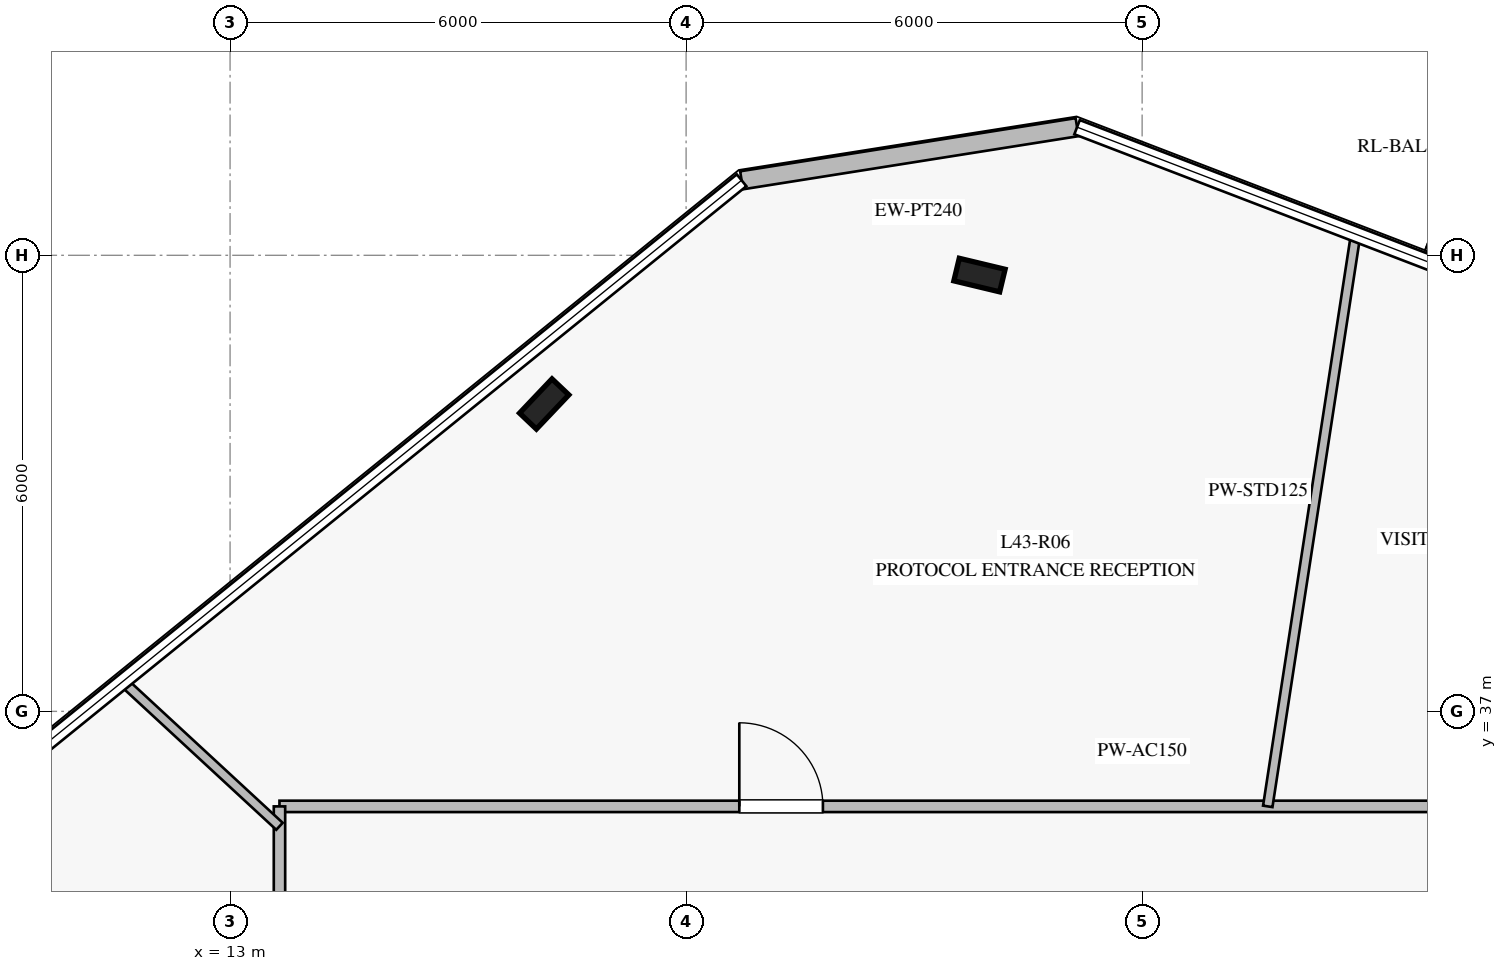
"""IFC4 building model, lengths in metres.
Left out: names, types, materials, properties, quantities, classifications, styles, units other than length and angle.
Written with IfcOpenShell. Run it as: python <this file> out.ifc"""

import sys

from ifc_helpers import new_model, si_unit, direction, frame, frame_2d, origin, origin_2d, place, context, subcontext, project, spatial, rectangle, i_section, extrude, element, fill, save


model = new_model("IFC4")
c1 = context("Model", 3, precision=1e-05, world=origin(), true_north=direction((0.0, 1.0)))
c2 = subcontext(c1, "Body", "Model", "MODEL_VIEW")
j1 = project(units=[si_unit("LENGTHUNIT", "METRE"), si_unit("PLANEANGLEUNIT", "RADIAN")], contexts=[c1])
p1 = place(None, origin())
s1 = spatial("IfcSite", under=j1, at=p1, CompositionType="ELEMENT")
p2 = place(p1, origin())
s2 = spatial("IfcBuilding", under=s1, at=p2, CompositionType="ELEMENT")
p3 = place(p2, frame((0.0, 0.0, 180.8)))
s3 = spatial("IfcBuildingStorey", under=s2, at=p3, CompositionType="ELEMENT", Elevation=180.8)
for number, where, z_axis, x_axis in (
    (1, (22.86, 42.74, 0.0), (0.0, 0.0, 1.0), (-0.972, 0.233, 0.0)),
    (2, (17.133, 41.044, 0.0), (0.0, 0.0, 1.0), (0.688, 0.725, 0.0)),
):
    element("IfcColumn", number, at=place(p3, frame(where, z_axis=z_axis, x_axis=x_axis)), inside=s3, PredefinedType="COLUMN", context=c2, shape_type="SweptSolid", body=[
        extrude(i_section(OverallWidth=0.305, OverallDepth=0.62, WebThickness=0.021, FlangeThickness=0.04, at=origin_2d()), origin(), (0.0, 0.0, 1.0), 4.0),
    ])
p4 = place(p3, frame((24.144, 44.686, 0.0), z_axis=(0.0, 0.0, 1.0), x_axis=(-0.987693325828, -0.156402986275, 0.0)))
e3 = element("IfcWall", 3, at=p4, inside=s3, PredefinedType="STANDARD", context=c2, shape_type="SweptSolid", body=[
    extrude(rectangle(XDim=4.469, YDim=0.24, at=frame_2d((2.234, 0.0))), origin(), (0.0, 0.0, 1.0), 3.78),
])
p5 = place(p3, frame((13.65, 35.75, 0.0), z_axis=(0.0, 0.0, 1.0), x_axis=(1.0, 0.0, 0.0)))
e4 = element("IfcWall", 4, at=p5, inside=s3, PredefinedType="PARTITIONING", context=c2, shape_type="SweptSolid", body=[
    extrude(rectangle(XDim=22.7, YDim=0.15, at=frame_2d((11.35, 0.0))), origin(), (0.0, 0.0, 1.0), 3.05),
])
p6 = place(p5, frame((16.871, 0.0, 0.0)))
e5 = element("IfcOpeningElement", 5, at=p6, cuts=e4, PredefinedType="OPENING", context=c2, shape_type="SweptSolid", body=[
    extrude(rectangle(XDim=1.1, YDim=2.2, at=frame_2d((0.55, 1.1))), frame((0.0, 0.085, 0.0), z_axis=(0.0, -1.0, 0.0), x_axis=(1.0, 0.0, 0.0)), (0.0, 0.0, 1.0), 0.17),
])
p7 = place(p5, frame((6.05, 0.0, 0.0)))
e6 = element("IfcOpeningElement", 6, at=p7, cuts=e4, PredefinedType="OPENING", context=c2, shape_type="SweptSolid", body=[
    extrude(rectangle(XDim=1.1, YDim=2.2, at=frame_2d((0.55, 1.1))), frame((0.0, 0.085, 0.0), z_axis=(0.0, -1.0, 0.0), x_axis=(1.0, 0.0, 0.0)), (0.0, 0.0, 1.0), 0.17),
])
p8 = place(p3, frame((13.65, 14.25, 0.0), z_axis=(0.0, 0.0, 1.0), x_axis=(0.0, 1.0, 0.0)))
e7 = element("IfcWall", 7, at=p8, inside=s3, PredefinedType="PARTITIONING", context=c2, shape_type="SweptSolid", body=[
    extrude(rectangle(XDim=21.5, YDim=0.15, at=frame_2d((10.75, 0.0))), origin(), (0.0, 0.0, 1.0), 3.02),
])
p9 = place(p8, frame((14.488, 0.0, 0.0)))
e8 = element("IfcOpeningElement", 8, at=p9, cuts=e7, PredefinedType="OPENING", context=c2, shape_type="SweptSolid", body=[
    extrude(rectangle(XDim=1.1, YDim=2.2, at=frame_2d((0.55, 1.1))), frame((0.0, 0.085, 0.0), z_axis=(0.0, -1.0, 0.0), x_axis=(1.0, 0.0, 0.0)), (0.0, 0.0, 1.0), 0.17),
])
p10 = place(p3, frame((26.653, 35.75, 0.0), z_axis=(0.0, 0.0, 1.0), x_axis=(0.151972699026, 0.988384691682, 0.0)))
e9 = element("IfcWall", 9, at=p10, inside=s3, PredefinedType="PARTITIONING", context=c2, shape_type="SweptSolid", body=[
    extrude(rectangle(XDim=7.6, YDim=0.125, at=frame_2d((3.8, 0.0))), origin(), (0.0, 0.0, 1.0), 3.05),
])
p11 = place(p3, frame((13.65, 35.488, 0.0), z_axis=(0.0, 0.0, 1.0), x_axis=(-0.7343000475, 0.678825043911, 0.0)))
e10 = element("IfcWall", 10, at=p11, inside=s3, PredefinedType="PARTITIONING", context=c2, shape_type="SweptSolid", body=[
    extrude(rectangle(XDim=2.79, YDim=0.125, at=frame_2d((1.395, 0.0))), origin(), (0.0, 0.0, 1.0), 3.18),
])
p12 = place(p7, origin())
e11 = element("IfcDoor", 11, at=p12, inside=s3, OperationType="SINGLE_SWING_LEFT", PredefinedType="DOOR", context=c2, shape_type="SweptSolid", body=[
    extrude(rectangle(XDim=1.1, YDim=2.2, at=frame_2d((0.55, 1.1))), frame((0.0, 0.025, 0.0), z_axis=(0.0, -1.0, 0.0), x_axis=(1.0, 0.0, 0.0)), (0.0, 0.0, 1.0), 0.05),
])
fill(e6, e11)
save(model, sys.argv[1])
